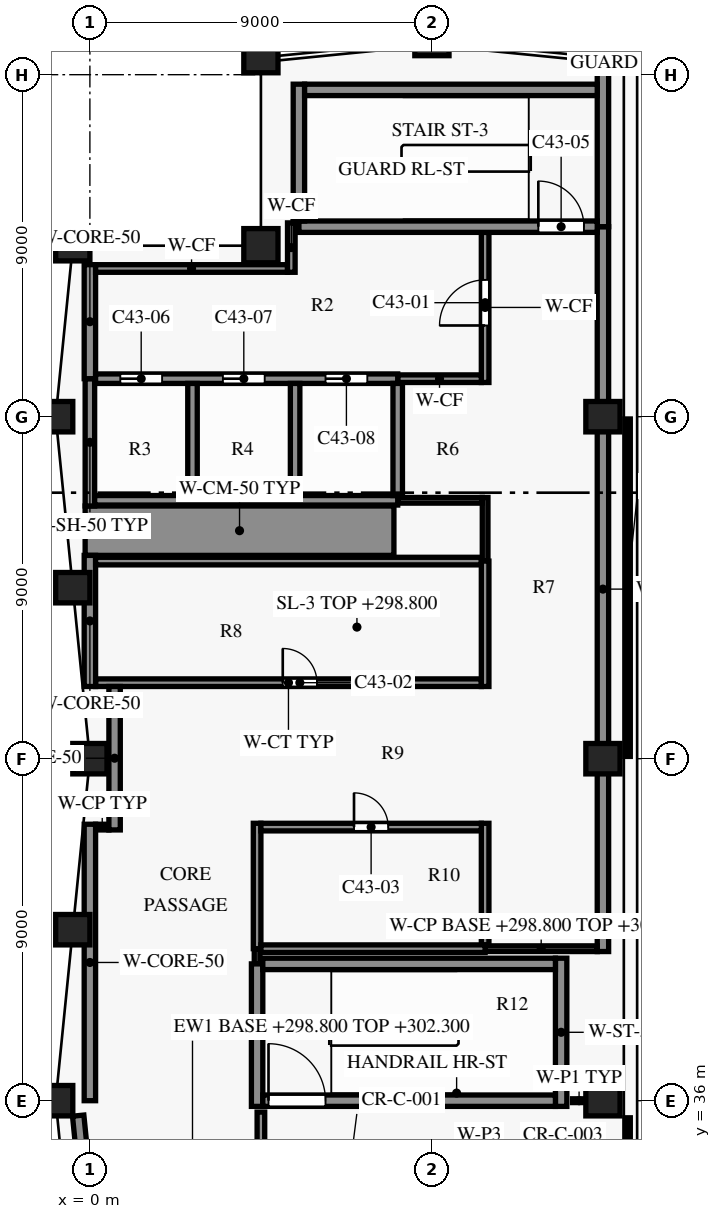
"""IFC4 building model, lengths in metres.
Left out: names, types, materials, properties, quantities, classifications, styles, units other than length and angle.
Written with IfcOpenShell. Run it as: python <this file> out.ifc"""

import sys

from ifc_helpers import new_model, si_unit, direction, frame, frame_2d, origin, origin_2d, place, context, subcontext, project, spatial, rectangle, extrude, element, fill, save


model = new_model("IFC4")
c1 = context("Model", 3, precision=1e-05, world=origin(), true_north=direction((0.0, 1.0)))
c2 = subcontext(c1, "Body", "Model", "MODEL_VIEW")
j1 = project(units=[si_unit("LENGTHUNIT", "METRE"), si_unit("PLANEANGLEUNIT", "RADIAN")], contexts=[c1])
p1 = place(None, origin())
s1 = spatial("IfcSite", under=j1, at=p1, CompositionType="ELEMENT")
p2 = place(p1, origin())
s2 = spatial("IfcBuilding", under=s1, at=p2, CompositionType="ELEMENT")
p3 = place(p2, frame((0.0, 0.0, 298.8)))
s3 = spatial("IfcBuildingStorey", under=s2, at=p3, CompositionType="ELEMENT", Elevation=298.8)
for number, where, z_axis, x_axis in (
    (1, (13.5, 36.0, 0.0), (0.0, 0.0, 1.0), (1.0, 0.0, 0.0)),
    (2, (13.5, 45.0, 0.0), (0.0, 0.0, 1.0), (1.0, 0.0, 0.0)),
    (3, (13.5, 54.0, 0.0), (0.0, 0.0, 1.0), (1.0, 0.0, 0.0)),
    (4, (13.5, 63.45, 0.0), (0.0, 0.0, 1.0), (-0.995, 0.1, 0.0)),
    (5, (9.0, 63.9, 0.0), (0.0, 0.0, 1.0), (-1.0, 0.0, 0.0)),
    (6, (4.5, 63.45, 0.0), (0.0, 0.0, 1.0), (-0.995, -0.1, 0.0)),
    (7, (-0.45, 58.5, 0.0), (0.0, 0.0, 1.0), (-0.1, -0.995, 0.0)),
    (8, (-0.9, 54.0, 0.0), (0.0, 0.0, 1.0), (0.0, -1.0, 0.0)),
    (9, (-0.45, 49.5, 0.0), (0.0, 0.0, 1.0), (0.1, -0.995, 0.0)),
    (10, (0.0, 45.0, 0.0), (0.0, 0.0, 1.0), (0.0, -1.0, 0.0)),
    (11, (-0.45, 40.5, 0.0), (0.0, 0.0, 1.0), (-0.1, -0.995, 0.0)),
    (12, (-0.9, 36.0, 0.0), (0.0, 0.0, 1.0), (0.0, -1.0, 0.0)),
):
    element("IfcColumn", number, at=place(p3, frame(where, z_axis=z_axis, x_axis=x_axis)), inside=s3, PredefinedType="COLUMN", context=c2, shape_type="SweptSolid", body=[
        extrude(rectangle(XDim=0.9, YDim=0.8, at=origin_2d()), origin(), (0.0, 0.0, 1.0), 4.0),
    ])
p4 = place(p3, frame((4.5, 58.5, 0.0), z_axis=(0.0, 0.0, 1.0), x_axis=(1.0, 0.0, 0.0)))
e13 = element("IfcColumn", 13, at=p4, inside=s3, PredefinedType="COLUMN", context=c2, shape_type="SweptSolid", body=[
    extrude(rectangle(XDim=0.9, YDim=0.9, at=origin_2d()), origin(), (0.0, 0.0, 1.0), 4.0),
])
p5 = place(p3, frame((0.061, 31.915, 0.0), z_axis=(0.0, 0.0, 1.0), x_axis=(-0.099549320092, 0.995032629048, 0.0)))
e14 = element("IfcWall", 14, at=p5, inside=s3, PredefinedType="SOLIDWALL", context=c2, shape_type="SweptSolid", body=[
    extrude(rectangle(XDim=3.71, YDim=0.3, at=frame_2d((1.855, 0.0))), origin(), (0.0, 0.0, 1.0), 3.5),
])
p6 = place(p3, frame((4.55, 36.0, 0.0), z_axis=(0.0, 0.0, 1.0), x_axis=(1.0, 0.0, 0.0)))
e15 = element("IfcWall", 15, at=p6, inside=s3, PredefinedType="SHEAR", context=c2, shape_type="SweptSolid", body=[
    extrude(rectangle(XDim=7.7, YDim=0.3, at=frame_2d((3.85, 0.0))), origin(), (0.0, 0.0, 1.0), 3.7),
])
p7 = place(p6, frame((0.15, 0.0, 0.0)))
e16 = element("IfcOpeningElement", 16, at=p7, cuts=e15, PredefinedType="OPENING", context=c2, shape_type="SweptSolid", body=[
    extrude(rectangle(XDim=1.5, YDim=2.2, at=frame_2d((0.75, 1.1))), frame((0.0, 0.16, 0.0), z_axis=(0.0, -1.0, 0.0), x_axis=(1.0, 0.0, 0.0)), (0.0, 0.0, 1.0), 0.32),
])
p8 = place(p3, frame((4.55, 39.6, 0.0), z_axis=(0.0, 0.0, 1.0), x_axis=(1.0, 0.0, 0.0)))
e17 = element("IfcWall", 17, at=p8, inside=s3, PredefinedType="SHEAR", context=c2, shape_type="SweptSolid", body=[
    extrude(rectangle(XDim=7.7, YDim=0.3, at=frame_2d((3.85, 0.0))), origin(), (0.0, 0.0, 1.0), 3.7),
])
p9 = place(p3, frame((10.4, 40.0, 0.0), z_axis=(0.0, 0.0, 1.0), x_axis=(1.0, 0.0, 0.0)))
e18 = element("IfcWall", 18, at=p9, inside=s3, PredefinedType="PARTITIONING", context=c2, shape_type="SweptSolid", body=[
    extrude(rectangle(XDim=2.95, YDim=0.15, at=frame_2d((1.475, 0.0))), origin(), (0.0, 0.0, 1.0), 3.35),
])
p10 = place(p3, frame((4.5, 40.0, 0.0), z_axis=(0.0, 0.0, 1.0), x_axis=(1.0, 0.0, 0.0)))
e19 = element("IfcWall", 19, at=p10, inside=s3, PredefinedType="PARTITIONING", context=c2, shape_type="SweptSolid", body=[
    extrude(rectangle(XDim=5.9, YDim=0.2, at=frame_2d((2.95, 0.0))), origin(), (0.0, 0.0, 1.0), 3.7),
])
p11 = place(p3, frame((0.15, 43.2, 0.0), z_axis=(0.0, 0.0, 1.0), x_axis=(1.0, 0.0, 0.0)))
e20 = element("IfcWall", 20, at=p11, inside=s3, PredefinedType="PARTITIONING", context=c2, shape_type="SweptSolid", body=[
    extrude(rectangle(XDim=0.35, YDim=0.15, at=frame_2d((0.175, 0.0))), origin(), (0.0, 0.0, 1.0), 3.7),
])
p12 = place(p3, frame((4.5, 43.2, 0.0), z_axis=(0.0, 0.0, 1.0), x_axis=(1.0, 0.0, 0.0)))
e21 = element("IfcWall", 21, at=p12, inside=s3, PredefinedType="PARTITIONING", context=c2, shape_type="SweptSolid", body=[
    extrude(rectangle(XDim=5.8, YDim=0.2, at=frame_2d((2.9, 0.0))), origin(), (0.0, 0.0, 1.0), 3.7),
])
p13 = place(p12, frame((2.45, 0.0, 0.0)))
e22 = element("IfcOpeningElement", 22, at=p13, cuts=e21, PredefinedType="OPENING", context=c2, shape_type="SweptSolid", body=[
    extrude(rectangle(XDim=0.9, YDim=2.1, at=frame_2d((0.45, 1.05))), frame((0.0, 0.11, 0.0), z_axis=(0.0, -1.0, 0.0), x_axis=(1.0, 0.0, 0.0)), (0.0, 0.0, 1.0), 0.22),
])
p14 = place(p3, frame((0.15, 47.0, 0.0), z_axis=(0.0, 0.0, 1.0), x_axis=(1.0, 0.0, 0.0)))
e23 = element("IfcWall", 23, at=p14, inside=s3, PredefinedType="PARTITIONING", context=c2, shape_type="SweptSolid", body=[
    extrude(rectangle(XDim=10.15, YDim=0.2, at=frame_2d((5.075, 0.0))), origin(), (0.0, 0.0, 1.0), 3.7),
])
p15 = place(p14, frame((4.925, 0.0, 0.0)))
e24 = element("IfcOpeningElement", 24, at=p15, cuts=e23, PredefinedType="OPENING", context=c2, shape_type="SweptSolid", body=[
    extrude(rectangle(XDim=0.9, YDim=2.1, at=frame_2d((0.45, 1.05))), frame((0.0, 0.11, 0.0), z_axis=(0.0, -1.0, 0.0), x_axis=(1.0, 0.0, 0.0)), (0.0, 0.0, 1.0), 0.22),
])
p16 = place(p3, frame((0.15, 50.2, 0.0), z_axis=(0.0, 0.0, 1.0), x_axis=(1.0, 0.0, 0.0)))
e25 = element("IfcWall", 25, at=p16, inside=s3, PredefinedType="PARTITIONING", context=c2, shape_type="SweptSolid", body=[
    extrude(rectangle(XDim=10.15, YDim=0.2, at=frame_2d((5.075, 0.0))), origin(), (0.0, 0.0, 1.0), 3.7),
])
p17 = place(p3, frame((-0.125, 51.0, 0.0), z_axis=(0.0, 0.0, 1.0), x_axis=(1.0, 0.0, 0.0)))
e26 = element("IfcWall", 26, at=p17, inside=s3, PredefinedType="SHEAR", context=c2, shape_type="SweptSolid", body=[
    extrude(rectangle(XDim=8.125, YDim=1.3, at=frame_2d((4.062, 0.0))), origin(), (0.0, 0.0, 1.0), 3.7),
])
p18 = place(p3, frame((8.1, 51.8, 0.0), z_axis=(0.0, 0.0, 1.0), x_axis=(1.0, 0.0, 0.0)))
e27 = element("IfcWall", 27, at=p18, inside=s3, PredefinedType="PARTITIONING", context=c2, shape_type="SweptSolid", body=[
    extrude(rectangle(XDim=2.225, YDim=0.15, at=frame_2d((1.112, 0.0))), origin(), (0.0, 0.0, 1.0), 3.7),
])
p19 = place(p3, frame((0.125, 51.8, 0.0), z_axis=(0.0, 0.0, 1.0), x_axis=(1.0, 0.0, 0.0)))
e28 = element("IfcWall", 28, at=p19, inside=s3, PredefinedType="SHEAR", context=c2, shape_type="SweptSolid", body=[
    extrude(rectangle(XDim=7.975, YDim=0.25, at=frame_2d((3.988, 0.0))), origin(), (0.0, 0.0, 1.0), 3.7),
])
p20 = place(p3, frame((8.1, 55.0, 0.0), z_axis=(0.0, 0.0, 1.0), x_axis=(1.0, 0.0, 0.0)))
e29 = element("IfcWall", 29, at=p20, inside=s3, PredefinedType="PARTITIONING", context=c2, shape_type="SweptSolid", body=[
    extrude(rectangle(XDim=2.2, YDim=0.2, at=frame_2d((1.1, 0.0))), origin(), (0.0, 0.0, 1.0), 3.7),
])
p21 = place(p3, frame((0.15, 55.0, 0.0), z_axis=(0.0, 0.0, 1.0), x_axis=(1.0, 0.0, 0.0)))
e30 = element("IfcWall", 30, at=p21, inside=s3, PredefinedType="SHEAR", context=c2, shape_type="SweptSolid", body=[
    extrude(rectangle(XDim=7.95, YDim=0.25, at=frame_2d((3.975, 0.0))), origin(), (0.0, 0.0, 1.0), 3.7),
])
p22 = place(p21, frame((0.65, 0.0, 0.0)))
e31 = element("IfcOpeningElement", 31, at=p22, cuts=e30, PredefinedType="OPENING", context=c2, shape_type="SweptSolid", body=[
    extrude(rectangle(XDim=1.1, YDim=2.1, at=frame_2d((0.55, 1.05))), frame((0.0, 0.135, 0.0), z_axis=(0.0, -1.0, 0.0), x_axis=(1.0, 0.0, 0.0)), (0.0, 0.0, 1.0), 0.27),
])
p23 = place(p21, frame((3.35, 0.0, 0.0)))
e32 = element("IfcOpeningElement", 32, at=p23, cuts=e30, PredefinedType="OPENING", context=c2, shape_type="SweptSolid", body=[
    extrude(rectangle(XDim=1.1, YDim=2.1, at=frame_2d((0.55, 1.05))), frame((0.0, 0.135, 0.0), z_axis=(0.0, -1.0, 0.0), x_axis=(1.0, 0.0, 0.0)), (0.0, 0.0, 1.0), 0.27),
])
p24 = place(p21, frame((6.05, 0.0, 0.0)))
e33 = element("IfcOpeningElement", 33, at=p24, cuts=e30, PredefinedType="OPENING", context=c2, shape_type="SweptSolid", body=[
    extrude(rectangle(XDim=1.1, YDim=2.1, at=frame_2d((0.55, 1.05))), frame((0.0, 0.135, 0.0), z_axis=(0.0, -1.0, 0.0), x_axis=(1.0, 0.0, 0.0)), (0.0, 0.0, 1.0), 0.27),
])
p25 = place(p3, frame((0.15, 57.9, 0.0), z_axis=(0.0, 0.0, 1.0), x_axis=(1.0, 0.0, 0.0)))
e34 = element("IfcWall", 34, at=p25, inside=s3, PredefinedType="PARTITIONING", context=c2, shape_type="SweptSolid", body=[
    extrude(rectangle(XDim=5.05, YDim=0.2, at=frame_2d((2.525, 0.0))), origin(), (0.0, 0.0, 1.0), 3.7),
])
p26 = place(p3, frame((5.5, 59.0, 0.0), z_axis=(0.0, 0.0, 1.0), x_axis=(1.0, 0.0, 0.0)))
e35 = element("IfcWall", 35, at=p26, inside=s3, PredefinedType="SHEAR", context=c2, shape_type="SweptSolid", body=[
    extrude(rectangle(XDim=7.85, YDim=0.3, at=frame_2d((3.925, 0.0))), origin(), (0.0, 0.0, 1.0), 3.7),
])
p27 = place(p26, frame((6.3, 0.0, 0.0)))
e36 = element("IfcOpeningElement", 36, at=p27, cuts=e35, PredefinedType="OPENING", context=c2, shape_type="SweptSolid", body=[
    extrude(rectangle(XDim=1.2, YDim=2.2, at=frame_2d((0.6, 1.1))), frame((0.0, 0.16, 0.0), z_axis=(0.0, -1.0, 0.0), x_axis=(1.0, 0.0, 0.0)), (0.0, 0.0, 1.0), 0.32),
])
p28 = place(p3, frame((5.65, 62.6, 0.0), z_axis=(0.0, 0.0, 1.0), x_axis=(1.0, 0.0, 0.0)))
e37 = element("IfcWall", 37, at=p28, inside=s3, PredefinedType="SHEAR", context=c2, shape_type="SweptSolid", body=[
    extrude(rectangle(XDim=7.7, YDim=0.3, at=frame_2d((3.85, 0.0))), origin(), (0.0, 0.0, 1.0), 3.7),
])
p29 = place(p3, frame((0.0, 36.0, 0.0), z_axis=(0.0, 0.0, 1.0), x_axis=(0.0, 1.0, 0.0)))
e38 = element("IfcWall", 38, at=p29, inside=s3, PredefinedType="SHEAR", context=c2, shape_type="SweptSolid", body=[
    extrude(rectangle(XDim=7.275, YDim=0.3, at=frame_2d((3.637, 0.0))), origin(), (0.0, 0.0, 1.0), 3.7),
])
p30 = place(p3, frame((0.0, 46.9, 0.0), z_axis=(0.0, 0.0, 1.0), x_axis=(0.0, 1.0, 0.0)))
e39 = element("IfcWall", 39, at=p30, inside=s3, PredefinedType="SHEAR", context=c2, shape_type="SweptSolid", body=[
    extrude(rectangle(XDim=3.45, YDim=0.3, at=frame_2d((1.725, 0.0))), origin(), (0.0, 0.0, 1.0), 3.7),
])
p31 = place(p3, frame((0.0, 55.0, 0.0), z_axis=(0.0, 0.0, 1.0), x_axis=(0.0, 1.0, 0.0)))
e40 = element("IfcWall", 40, at=p31, inside=s3, PredefinedType="SHEAR", context=c2, shape_type="SweptSolid", body=[
    extrude(rectangle(XDim=3.0, YDim=0.3, at=frame_2d((1.5, 0.0))), origin(), (0.0, 0.0, 1.0), 3.7),
])
p32 = place(p3, frame((0.0, 51.65, 0.0), z_axis=(0.0, 0.0, 1.0), x_axis=(0.0, 1.0, 0.0)))
e41 = element("IfcWall", 41, at=p32, inside=s3, PredefinedType="SHEAR", context=c2, shape_type="SweptSolid", body=[
    extrude(rectangle(XDim=3.35, YDim=0.25, at=frame_2d((1.675, 0.0))), origin(), (0.0, 0.0, 1.0), 3.7),
])
p33 = place(p3, frame((0.65, 43.125, 0.0), z_axis=(0.0, 0.0, 1.0), x_axis=(0.0, 1.0, 0.0)))
e42 = element("IfcWall", 42, at=p33, inside=s3, PredefinedType="SHEAR", context=c2, shape_type="SweptSolid", body=[
    extrude(rectangle(XDim=3.775, YDim=0.3, at=frame_2d((1.887, 0.0))), origin(), (0.0, 0.0, 1.0), 3.7),
])
p34 = place(p3, frame((2.7, 51.925, 0.0), z_axis=(0.0, 0.0, 1.0), x_axis=(0.0, 1.0, 0.0)))
e43 = element("IfcWall", 43, at=p34, inside=s3, PredefinedType="SHEAR", context=c2, shape_type="SweptSolid", body=[
    extrude(rectangle(XDim=2.95, YDim=0.25, at=frame_2d((1.475, 0.0))), origin(), (0.0, 0.0, 1.0), 3.7),
])
p35 = place(p3, frame((4.4, 39.6, 0.0), z_axis=(0.0, 0.0, 1.0), x_axis=(0.0, 1.0, 0.0)))
e44 = element("IfcWall", 44, at=p35, inside=s3, PredefinedType="PARTITIONING", context=c2, shape_type="SweptSolid", body=[
    extrude(rectangle(XDim=0.4, YDim=0.15, at=frame_2d((0.2, 0.0))), origin(), (0.0, 0.0, 1.0), 3.7),
])
p36 = place(p3, frame((4.4, 40.0, 0.0), z_axis=(0.0, 0.0, 1.0), x_axis=(0.0, 1.0, 0.0)))
e45 = element("IfcWall", 45, at=p36, inside=s3, PredefinedType="PARTITIONING", context=c2, shape_type="SweptSolid", body=[
    extrude(rectangle(XDim=3.3, YDim=0.2, at=frame_2d((1.65, 0.0))), origin(), (0.0, 0.0, 1.0), 3.7),
])
p37 = place(p3, frame((4.4, 35.85, 0.0), z_axis=(0.0, 0.0, 1.0), x_axis=(0.0, 1.0, 0.0)))
e46 = element("IfcWall", 46, at=p37, inside=s3, PredefinedType="SHEAR", context=c2, shape_type="SweptSolid", body=[
    extrude(rectangle(XDim=3.75, YDim=0.3, at=frame_2d((1.875, 0.0))), origin(), (0.0, 0.0, 1.0), 3.7),
])
p38 = place(p3, frame((5.3, 57.8, 0.0), z_axis=(0.0, 0.0, 1.0), x_axis=(0.0, 1.0, 0.0)))
e47 = element("IfcWall", 47, at=p38, inside=s3, PredefinedType="PARTITIONING", context=c2, shape_type="SweptSolid", body=[
    extrude(rectangle(XDim=1.3, YDim=0.2, at=frame_2d((0.65, 0.0))), origin(), (0.0, 0.0, 1.0), 3.7),
])
p39 = place(p3, frame((5.4, 51.925, 0.0), z_axis=(0.0, 0.0, 1.0), x_axis=(0.0, 1.0, 0.0)))
e48 = element("IfcWall", 48, at=p39, inside=s3, PredefinedType="SHEAR", context=c2, shape_type="SweptSolid", body=[
    extrude(rectangle(XDim=2.95, YDim=0.25, at=frame_2d((1.475, 0.0))), origin(), (0.0, 0.0, 1.0), 3.7),
])
p40 = place(p3, frame((5.5, 59.15, 0.0), z_axis=(0.0, 0.0, 1.0), x_axis=(0.0, 1.0, 0.0)))
e49 = element("IfcWall", 49, at=p40, inside=s3, PredefinedType="SHEAR", context=c2, shape_type="SweptSolid", body=[
    extrude(rectangle(XDim=3.6, YDim=0.3, at=frame_2d((1.8, 0.0))), origin(), (0.0, 0.0, 1.0), 3.7),
])
p41 = place(p3, frame((8.1, 51.925, 0.0), z_axis=(0.0, 0.0, 1.0), x_axis=(0.0, 1.0, 0.0)))
e50 = element("IfcWall", 50, at=p41, inside=s3, PredefinedType="SHEAR", context=c2, shape_type="SweptSolid", body=[
    extrude(rectangle(XDim=2.95, YDim=0.25, at=frame_2d((1.475, 0.0))), origin(), (0.0, 0.0, 1.0), 3.7),
])
p42 = place(p3, frame((10.4, 54.9, 0.0), z_axis=(0.0, 0.0, 1.0), x_axis=(0.0, 1.0, 0.0)))
e51 = element("IfcWall", 51, at=p42, inside=s3, PredefinedType="PARTITIONING", context=c2, shape_type="SweptSolid", body=[
    extrude(rectangle(XDim=3.95, YDim=0.2, at=frame_2d((1.975, 0.0))), origin(), (0.0, 0.0, 1.0), 3.7),
])
p43 = place(p42, frame((1.5, 0.0, 0.0)))
e52 = element("IfcOpeningElement", 52, at=p43, cuts=e51, PredefinedType="OPENING", context=c2, shape_type="SweptSolid", body=[
    extrude(rectangle(XDim=1.2, YDim=2.2, at=frame_2d((0.6, 1.1))), frame((0.0, 0.11, 0.0), z_axis=(0.0, -1.0, 0.0), x_axis=(1.0, 0.0, 0.0)), (0.0, 0.0, 1.0), 0.22),
])
p44 = place(p3, frame((10.4, 50.2, 0.0), z_axis=(0.0, 0.0, 1.0), x_axis=(0.0, 1.0, 0.0)))
e53 = element("IfcWall", 53, at=p44, inside=s3, PredefinedType="PARTITIONING", context=c2, shape_type="SweptSolid", body=[
    extrude(rectangle(XDim=1.675, YDim=0.15, at=frame_2d((0.837, 0.0))), origin(), (0.0, 0.0, 1.0), 3.7),
])
p45 = place(p3, frame((10.4, 40.1, 0.0), z_axis=(0.0, 0.0, 1.0), x_axis=(0.0, 1.0, 0.0)))
e54 = element("IfcWall", 54, at=p45, inside=s3, PredefinedType="PARTITIONING", context=c2, shape_type="SweptSolid", body=[
    extrude(rectangle(XDim=3.2, YDim=0.2, at=frame_2d((1.6, 0.0))), origin(), (0.0, 0.0, 1.0), 3.7),
])
p46 = place(p3, frame((10.4, 46.9, 0.0), z_axis=(0.0, 0.0, 1.0), x_axis=(0.0, 1.0, 0.0)))
e55 = element("IfcWall", 55, at=p46, inside=s3, PredefinedType="PARTITIONING", context=c2, shape_type="SweptSolid", body=[
    extrude(rectangle(XDim=3.3, YDim=0.2, at=frame_2d((1.65, 0.0))), origin(), (0.0, 0.0, 1.0), 3.7),
])
p47 = place(p3, frame((12.4, 35.85, 0.0), z_axis=(0.0, 0.0, 1.0), x_axis=(0.0, 1.0, 0.0)))
e56 = element("IfcWall", 56, at=p47, inside=s3, PredefinedType="SHEAR", context=c2, shape_type="SweptSolid", body=[
    extrude(rectangle(XDim=3.9, YDim=0.3, at=frame_2d((1.95, 0.0))), origin(), (0.0, 0.0, 1.0), 3.7),
])
p48 = place(p3, frame((13.5, 39.925, 0.0), z_axis=(0.0, 0.0, 1.0), x_axis=(0.0, 1.0, 0.0)))
e57 = element("IfcWall", 57, at=p48, inside=s3, PredefinedType="SHEAR", context=c2, shape_type="SweptSolid", body=[
    extrude(rectangle(XDim=19.075, YDim=0.3, at=frame_2d((9.538, 0.0))), origin(), (0.0, 0.0, 1.0), 3.7),
])
p49 = place(p3, frame((13.5, 59.0, 0.0), z_axis=(0.0, 0.0, 1.0), x_axis=(0.0, 1.0, 0.0)))
e58 = element("IfcWall", 58, at=p49, inside=s3, PredefinedType="SHEAR", context=c2, shape_type="SweptSolid", body=[
    extrude(rectangle(XDim=4.048, YDim=0.3, at=frame_2d((2.024, 0.0))), origin(), (0.0, 0.0, 1.0), 3.7),
])
p50 = place(p3, frame((4.5, 33.6, 0.0), z_axis=(0.0, 0.0, 1.0), x_axis=(0.0, 1.0, 0.0)))
e59 = element("IfcWall", 59, at=p50, inside=s3, PredefinedType="PARTITIONING", context=c2, shape_type="SweptSolid", body=[
    extrude(rectangle(XDim=2.1, YDim=0.2, at=frame_2d((1.05, 0.0))), origin(), (0.0, 0.0, 1.0), 3.68),
])
p51 = place(p3, frame((12.7, 36.0, 0.0), z_axis=(0.0, 0.0, 1.0), x_axis=(1.0, 0.0, 0.0)))
e60 = element("IfcWall", 60, at=p51, inside=s3, PredefinedType="PARTITIONING", context=c2, shape_type="SweptSolid", body=[
    extrude(rectangle(XDim=0.345, YDim=0.1, at=frame_2d((0.172, 0.0))), origin(), (0.0, 0.0, 1.0), 3.68),
])
p52 = place(p43, origin())
e61 = element("IfcDoor", 61, at=p52, inside=s3, OperationType="SINGLE_SWING_RIGHT", PredefinedType="DOOR", context=c2, shape_type="SweptSolid", body=[
    extrude(rectangle(XDim=1.2, YDim=2.2, at=frame_2d((0.6, 1.1))), frame((0.0, 0.025, 0.0), z_axis=(0.0, -1.0, 0.0), x_axis=(1.0, 0.0, 0.0)), (0.0, 0.0, 1.0), 0.05),
])
fill(e52, e61)
p53 = place(p15, origin())
e62 = element("IfcDoor", 62, at=p53, inside=s3, OperationType="SINGLE_SWING_RIGHT", PredefinedType="DOOR", context=c2, shape_type="SweptSolid", body=[
    extrude(rectangle(XDim=0.9, YDim=2.1, at=frame_2d((0.45, 1.05))), frame((0.0, 0.025, 0.0), z_axis=(0.0, -1.0, 0.0), x_axis=(1.0, 0.0, 0.0)), (0.0, 0.0, 1.0), 0.05),
])
fill(e24, e62)
p54 = place(p13, origin())
e63 = element("IfcDoor", 63, at=p54, inside=s3, OperationType="SINGLE_SWING_LEFT", PredefinedType="DOOR", context=c2, shape_type="SweptSolid", body=[
    extrude(rectangle(XDim=0.9, YDim=2.1, at=frame_2d((0.45, 1.05))), frame((0.0, 0.025, 0.0), z_axis=(0.0, -1.0, 0.0), x_axis=(1.0, 0.0, 0.0)), (0.0, 0.0, 1.0), 0.05),
])
fill(e22, e63)
p55 = place(p7, origin())
e64 = element("IfcDoor", 64, at=p55, inside=s3, OperationType="SINGLE_SWING_RIGHT", PredefinedType="DOOR", context=c2, shape_type="SweptSolid", body=[
    extrude(rectangle(XDim=1.5, YDim=2.2, at=frame_2d((0.75, 1.1))), frame((0.0, 0.025, 0.0), z_axis=(0.0, -1.0, 0.0), x_axis=(1.0, 0.0, 0.0)), (0.0, 0.0, 1.0), 0.05),
])
fill(e16, e64)
p56 = place(p27, origin())
e65 = element("IfcDoor", 65, at=p56, inside=s3, OperationType="SINGLE_SWING_RIGHT", PredefinedType="DOOR", context=c2, shape_type="SweptSolid", body=[
    extrude(rectangle(XDim=1.2, YDim=2.2, at=frame_2d((0.6, 1.1))), frame((0.0, 0.025, 0.0), z_axis=(0.0, -1.0, 0.0), x_axis=(1.0, 0.0, 0.0)), (0.0, 0.0, 1.0), 0.05),
])
fill(e36, e65)
p57 = place(p22, origin())
e66 = element("IfcDoor", 66, at=p57, inside=s3, OperationType="DOUBLE_DOOR_SLIDING", PredefinedType="DOOR", context=c2, shape_type="SweptSolid", body=[
    extrude(rectangle(XDim=1.1, YDim=2.1, at=frame_2d((0.55, 1.05))), frame((0.0, 0.025, 0.0), z_axis=(0.0, -1.0, 0.0), x_axis=(1.0, 0.0, 0.0)), (0.0, 0.0, 1.0), 0.05),
])
fill(e31, e66)
p58 = place(p23, origin())
e67 = element("IfcDoor", 67, at=p58, inside=s3, OperationType="DOUBLE_DOOR_SLIDING", PredefinedType="DOOR", context=c2, shape_type="SweptSolid", body=[
    extrude(rectangle(XDim=1.1, YDim=2.1, at=frame_2d((0.55, 1.05))), frame((0.0, 0.025, 0.0), z_axis=(0.0, -1.0, 0.0), x_axis=(1.0, 0.0, 0.0)), (0.0, 0.0, 1.0), 0.05),
])
fill(e32, e67)
p59 = place(p24, origin())
e68 = element("IfcDoor", 68, at=p59, inside=s3, OperationType="DOUBLE_DOOR_SLIDING", PredefinedType="DOOR", context=c2, shape_type="SweptSolid", body=[
    extrude(rectangle(XDim=1.1, YDim=2.1, at=frame_2d((0.55, 1.05))), frame((0.0, 0.025, 0.0), z_axis=(0.0, -1.0, 0.0), x_axis=(1.0, 0.0, 0.0)), (0.0, 0.0, 1.0), 0.05),
])
fill(e33, e68)
save(model, sys.argv[1])
